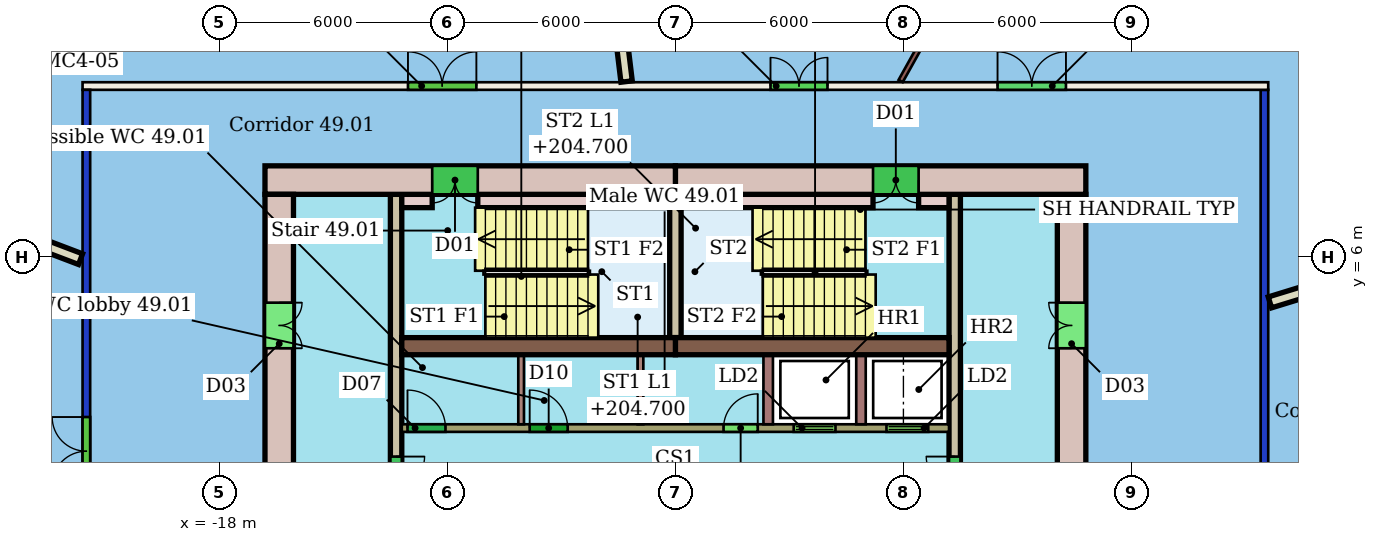
"""IFC4 building model, lengths in metres.
Left out: names, types, materials, properties, quantities, classifications, styles, units other than length and angle.
Written with IfcOpenShell. Run it as: python <this file> out.ifc"""

import sys

from ifc_helpers import new_model, si_unit, direction, frame, frame_2d, origin, place, context, subcontext, project, spatial, rectangle, extrude, element, fill, save


model = new_model("IFC4")
c1 = context("Model", 3, precision=1e-05, world=origin(), true_north=direction((0.0, 1.0)))
c2 = subcontext(c1, "Body", "Model", "MODEL_VIEW")
j1 = project(units=[si_unit("LENGTHUNIT", "METRE"), si_unit("PLANEANGLEUNIT", "RADIAN")], contexts=[c1])
p1 = place(None, origin())
s1 = spatial("IfcSite", under=j1, at=p1, CompositionType="ELEMENT")
p2 = place(p1, origin())
s2 = spatial("IfcBuilding", under=s1, at=p2, CompositionType="ELEMENT")
p3 = place(p2, frame((0.0, 0.0, 202.9)))
s3 = spatial("IfcBuildingStorey", under=s2, at=p3, CompositionType="ELEMENT", Elevation=202.9)
p4 = place(p3, frame((-21.5, -10.4, 0.0), z_axis=(0.0, 0.0, 1.0), x_axis=(0.0, 1.0, 0.0)))
e1 = element("IfcWall", 1, at=p4, inside=s3, PredefinedType="PARTITIONING", context=c2, shape_type="SweptSolid", body=[
    extrude(rectangle(XDim=20.8, YDim=0.2, at=frame_2d((10.4, 0.0))), origin(), (0.0, 0.0, 1.0), 3.05),
])
p5 = place(p4, frame((10.391, 0.0, 0.0)))
e2 = element("IfcOpeningElement", 2, at=p5, cuts=e1, PredefinedType="OPENING", context=c2, shape_type="SweptSolid", body=[
    extrude(rectangle(XDim=1.8, YDim=2.4, at=frame_2d((0.9, 1.2))), frame((0.0, 0.11, 0.0), z_axis=(0.0, -1.0, 0.0), x_axis=(1.0, 0.0, 0.0)), (0.0, 0.0, 1.0), 0.22),
])
p6 = place(p3, frame((-21.6, 10.5, 0.0), z_axis=(0.0, 0.0, 1.0), x_axis=(1.0, 0.0, 0.0)))
e3 = element("IfcWall", 3, at=p6, inside=s3, PredefinedType="PARTITIONING", context=c2, shape_type="SweptSolid", body=[
    extrude(rectangle(XDim=31.2, YDim=0.2, at=frame_2d((15.6, 0.0))), origin(), (0.0, 0.0, 1.0), 3.45),
])
p7 = place(p6, frame((18.102, 0.0, 0.0)))
e4 = element("IfcOpeningElement", 4, at=p7, cuts=e3, PredefinedType="OPENING", context=c2, shape_type="SweptSolid", body=[
    extrude(rectangle(XDim=1.5, YDim=2.1, at=frame_2d((0.75, 1.05))), frame((0.0, 0.11, 0.0), z_axis=(0.0, -1.0, 0.0), x_axis=(1.0, 0.0, 0.0)), (0.0, 0.0, 1.0), 0.22),
])
p8 = place(p6, frame((8.563, 0.0, 0.0)))
e5 = element("IfcOpeningElement", 5, at=p8, cuts=e3, PredefinedType="OPENING", context=c2, shape_type="SweptSolid", body=[
    extrude(rectangle(XDim=1.8, YDim=2.4, at=frame_2d((0.9, 1.2))), frame((0.0, 0.11, 0.0), z_axis=(0.0, -1.0, 0.0), x_axis=(1.0, 0.0, 0.0)), (0.0, 0.0, 1.0), 0.22),
])
p9 = place(p6, frame((24.077, 0.0, 0.0)))
e6 = element("IfcOpeningElement", 6, at=p9, cuts=e3, PredefinedType="OPENING", context=c2, shape_type="SweptSolid", body=[
    extrude(rectangle(XDim=1.8, YDim=2.1, at=frame_2d((0.9, 1.05))), frame((0.0, 0.11, 0.0), z_axis=(0.0, -1.0, 0.0), x_axis=(1.0, 0.0, 0.0)), (0.0, 0.0, 1.0), 0.22),
])
p10 = place(p3, frame((9.5, 10.4, 0.0), z_axis=(0.0, 0.0, 1.0), x_axis=(0.0, -1.0, 0.0)))
e7 = element("IfcWall", 7, at=p10, inside=s3, PredefinedType="PARTITIONING", context=c2, shape_type="SweptSolid", body=[
    extrude(rectangle(XDim=20.8, YDim=0.2, at=frame_2d((10.4, 0.0))), origin(), (0.0, 0.0, 1.0), 3.05),
])
p11 = place(p10, frame((9.885, 0.0, 0.0)))
e8 = element("IfcOpeningElement", 8, at=p11, cuts=e7, PredefinedType="OPENING", context=c2, shape_type="SweptSolid", body=[
    extrude(rectangle(XDim=1.8, YDim=2.4, at=frame_2d((0.9, 1.2))), frame((0.0, 0.11, 0.0), z_axis=(0.0, -1.0, 0.0), x_axis=(1.0, 0.0, 0.0)), (0.0, 0.0, 1.0), 0.22),
])
p12 = place(p3, frame((6.863, 23.071, 0.0), z_axis=(0.0, 0.0, 1.0), x_axis=(-0.486953657805, -0.873427807635, 0.0)))
e9 = element("IfcWall", 9, at=p12, inside=s3, PredefinedType="PARTITIONING", context=c2, shape_type="SweptSolid", body=[
    extrude(rectangle(XDim=14.243, YDim=0.125, at=frame_2d((7.122, 0.0))), origin(), (0.0, 0.0, 1.0), 3.45),
])
p13 = place(p3, frame((-8.816, 23.289, 0.0), z_axis=(0.0, 0.0, 1.0), x_axis=(0.120069156686, -0.992765530029, 0.0)))
e10 = element("IfcWall", 10, at=p13, inside=s3, PredefinedType="PARTITIONING", context=c2, shape_type="SweptSolid", body=[
    extrude(rectangle(XDim=12.763, YDim=0.3, at=frame_2d((6.382, 0.0))), origin(), (0.0, 0.0, 1.0), 3.45),
])
p14 = place(p3, frame((-27.419, 8.134, 0.0), z_axis=(0.0, 0.0, 1.0), x_axis=(0.934858486825, -0.355020576322, 0.0)))
e11 = element("IfcWall", 11, at=p14, inside=s3, PredefinedType="PARTITIONING", context=c2, shape_type="SweptSolid", body=[
    extrude(rectangle(XDim=6.167, YDim=0.3, at=frame_2d((3.083, 0.0))), origin(), (0.0, 0.0, 1.0), 3.45),
])
p15 = place(p3, frame((18.788, 7.617, 0.0), z_axis=(0.0, 0.0, 1.0), x_axis=(-0.955883790435, -0.293745092188, 0.0)))
e12 = element("IfcWall", 12, at=p15, inside=s3, PredefinedType="PARTITIONING", context=c2, shape_type="SweptSolid", body=[
    extrude(rectangle(XDim=9.566, YDim=0.3, at=frame_2d((4.783, 0.0))), origin(), (0.0, 0.0, 1.0), 3.45),
])
p16 = place(p3, frame((4.8, 8.025, 0.0), z_axis=(0.0, 0.0, 1.0), x_axis=(-1.0, 0.0, 0.0)))
e13 = element("IfcWall", 13, at=p16, inside=s3, PredefinedType="SHEAR", context=c2, shape_type="SweptSolid", body=[
    extrude(rectangle(XDim=10.8, YDim=0.75, at=frame_2d((5.4, 0.0))), origin(), (0.0, 0.0, 1.0), 3.3),
])
p17 = place(p16, frame((4.4, 0.0, 0.0)))
e14 = element("IfcOpeningElement", 14, at=p17, cuts=e13, PredefinedType="OPENING", context=c2, shape_type="SweptSolid", body=[
    extrude(rectangle(XDim=1.2, YDim=2.1, at=frame_2d((0.6, 1.05))), frame((0.0, 0.385, 0.0), z_axis=(0.0, -1.0, 0.0), x_axis=(1.0, 0.0, 0.0)), (0.0, 0.0, 1.0), 0.77),
])
p18 = place(p3, frame((-6.0, 8.025, 0.0), z_axis=(0.0, 0.0, 1.0), x_axis=(-1.0, 0.0, 0.0)))
e15 = element("IfcWall", 15, at=p18, inside=s3, PredefinedType="SHEAR", context=c2, shape_type="SweptSolid", body=[
    extrude(rectangle(XDim=10.8, YDim=0.75, at=frame_2d((5.4, 0.0))), origin(), (0.0, 0.0, 1.0), 3.3),
])
p19 = place(p18, frame((5.2, 0.0, 0.0)))
e16 = element("IfcOpeningElement", 16, at=p19, cuts=e15, PredefinedType="OPENING", context=c2, shape_type="SweptSolid", body=[
    extrude(rectangle(XDim=1.2, YDim=2.1, at=frame_2d((0.6, 1.05))), frame((0.0, 0.385, 0.0), z_axis=(0.0, -1.0, 0.0), x_axis=(1.0, 0.0, 0.0)), (0.0, 0.0, 1.0), 0.77),
])
p20 = place(p3, frame((-16.425, 7.65, 0.0), z_axis=(0.0, 0.0, 1.0), x_axis=(0.0, -1.0, 0.0)))
e17 = element("IfcWall", 17, at=p20, inside=s3, PredefinedType="SHEAR", context=c2, shape_type="SweptSolid", body=[
    extrude(rectangle(XDim=15.3, YDim=0.75, at=frame_2d((7.65, 0.0))), origin(), (0.0, 0.0, 1.0), 3.3),
])
p21 = place(p20, frame((11.25, 0.0, 0.0)))
e18 = element("IfcOpeningElement", 18, at=p21, cuts=e17, PredefinedType="OPENING", context=c2, shape_type="SweptSolid", body=[
    extrude(rectangle(XDim=1.2, YDim=2.1, at=frame_2d((0.6, 1.05))), frame((0.0, 0.385, 0.0), z_axis=(0.0, -1.0, 0.0), x_axis=(1.0, 0.0, 0.0)), (0.0, 0.0, 1.0), 0.77),
])
p22 = place(p20, frame((2.85, 0.0, 0.0)))
e19 = element("IfcOpeningElement", 19, at=p22, cuts=e17, PredefinedType="OPENING", context=c2, shape_type="SweptSolid", body=[
    extrude(rectangle(XDim=1.2, YDim=2.1, at=frame_2d((0.6, 1.05))), frame((0.0, 0.385, 0.0), z_axis=(0.0, -1.0, 0.0), x_axis=(1.0, 0.0, 0.0)), (0.0, 0.0, 1.0), 0.77),
])
p23 = place(p3, frame((4.425, -7.65, 0.0), z_axis=(0.0, 0.0, 1.0), x_axis=(0.0, 1.0, 0.0)))
e20 = element("IfcWall", 20, at=p23, inside=s3, PredefinedType="SHEAR", context=c2, shape_type="SweptSolid", body=[
    extrude(rectangle(XDim=15.3, YDim=0.75, at=frame_2d((7.65, 0.0))), origin(), (0.0, 0.0, 1.0), 3.3),
])
p24 = place(p23, frame((2.85, 0.0, 0.0)))
e21 = element("IfcOpeningElement", 21, at=p24, cuts=e20, PredefinedType="OPENING", context=c2, shape_type="SweptSolid", body=[
    extrude(rectangle(XDim=1.2, YDim=2.1, at=frame_2d((0.6, 1.05))), frame((0.0, 0.385, 0.0), z_axis=(0.0, -1.0, 0.0), x_axis=(1.0, 0.0, 0.0)), (0.0, 0.0, 1.0), 0.77),
])
p25 = place(p23, frame((11.25, 0.0, 0.0)))
e22 = element("IfcOpeningElement", 22, at=p25, cuts=e20, PredefinedType="OPENING", context=c2, shape_type="SweptSolid", body=[
    extrude(rectangle(XDim=1.2, YDim=2.1, at=frame_2d((0.6, 1.05))), frame((0.0, 0.385, 0.0), z_axis=(0.0, -1.0, 0.0), x_axis=(1.0, 0.0, 0.0)), (0.0, 0.0, 1.0), 0.77),
])
for number, where, z_axis, x_axis in (
    (23, (-13.2, 3.655, 0.0), (0.0, 0.0, 1.0), (1.0, 0.0, 0.0)),
    (24, (-6.0, 3.655, 0.0), (0.0, 0.0, 1.0), (1.0, 0.0, 0.0)),
):
    element("IfcWall", number, at=place(p3, frame(where, z_axis=z_axis, x_axis=x_axis)), inside=s3, PredefinedType="SHEAR", context=c2, shape_type="SweptSolid", body=[
        extrude(rectangle(XDim=7.2, YDim=0.45, at=frame_2d((3.6, 0.0))), origin(), (0.0, 0.0, 1.0), 3.3),
    ])
p26 = place(p3, frame((-13.35, 7.65, 0.0), z_axis=(0.0, 0.0, 1.0), x_axis=(0.0, -1.0, 0.0)))
e25 = element("IfcWall", 25, at=p26, inside=s3, PredefinedType="SHEAR", context=c2, shape_type="SweptSolid", body=[
    extrude(rectangle(XDim=15.3, YDim=0.3, at=frame_2d((7.65, 0.0))), origin(), (0.0, 0.0, 1.0), 3.3),
])
p27 = place(p26, frame((6.9, 0.0, 0.0)))
e26 = element("IfcOpeningElement", 26, at=p27, cuts=e25, PredefinedType="OPENING", context=c2, shape_type="SweptSolid", body=[
    extrude(rectangle(XDim=1.5, YDim=2.1, at=frame_2d((0.75, 1.05))), frame((0.0, 0.16, 0.0), z_axis=(0.0, -1.0, 0.0), x_axis=(1.0, 0.0, 0.0)), (0.0, 0.0, 1.0), 0.32),
])
p28 = place(p3, frame((1.35, -7.65, 0.0), z_axis=(0.0, 0.0, 1.0), x_axis=(0.0, 1.0, 0.0)))
e27 = element("IfcWall", 27, at=p28, inside=s3, PredefinedType="SHEAR", context=c2, shape_type="SweptSolid", body=[
    extrude(rectangle(XDim=15.3, YDim=0.3, at=frame_2d((7.65, 0.0))), origin(), (0.0, 0.0, 1.0), 3.3),
])
p29 = place(p28, frame((1.56, 0.0, 0.0)))
e28 = element("IfcOpeningElement", 28, at=p29, cuts=e27, PredefinedType="OPENING", context=c2, shape_type="SweptSolid", body=[
    extrude(rectangle(XDim=1.0, YDim=2.1, at=frame_2d((0.5, 1.05))), frame((0.0, 0.16, 0.0), z_axis=(0.0, -1.0, 0.0), x_axis=(1.0, 0.0, 0.0)), (0.0, 0.0, 1.0), 0.32),
])
p30 = place(p28, frame((6.9, 0.0, 0.0)))
e29 = element("IfcOpeningElement", 29, at=p30, cuts=e27, PredefinedType="OPENING", context=c2, shape_type="SweptSolid", body=[
    extrude(rectangle(XDim=1.5, YDim=2.1, at=frame_2d((0.75, 1.05))), frame((0.0, 0.16, 0.0), z_axis=(0.0, -1.0, 0.0), x_axis=(1.0, 0.0, 0.0)), (0.0, 0.0, 1.0), 0.32),
])
p31 = place(p3, frame((-13.2, 1.5, 0.0), z_axis=(0.0, 0.0, 1.0), x_axis=(1.0, 0.0, 0.0)))
e30 = element("IfcWall", 30, at=p31, inside=s3, PredefinedType="SHEAR", context=c2, shape_type="SweptSolid", body=[
    extrude(rectangle(XDim=14.4, YDim=0.2, at=frame_2d((7.2, 0.0))), origin(), (0.0, 0.0, 1.0), 3.3),
])
p32 = place(p31, frame((10.312, 0.0, 0.0)))
e31 = element("IfcOpeningElement", 31, at=p32, cuts=e30, PredefinedType="OPENING", context=c2, shape_type="SweptSolid", body=[
    extrude(rectangle(XDim=1.1, YDim=2.1, at=frame_2d((0.55, 1.05))), frame((0.0, 0.11, 0.0), z_axis=(0.0, -1.0, 0.0), x_axis=(1.0, 0.0, 0.0)), (0.0, 0.0, 1.0), 0.22),
])
p33 = place(p31, frame((12.754, 0.0, 0.0)))
e32 = element("IfcOpeningElement", 32, at=p33, cuts=e30, PredefinedType="OPENING", context=c2, shape_type="SweptSolid", body=[
    extrude(rectangle(XDim=1.1, YDim=2.1, at=frame_2d((0.55, 1.05))), frame((0.0, 0.11, 0.0), z_axis=(0.0, -1.0, 0.0), x_axis=(1.0, 0.0, 0.0)), (0.0, 0.0, 1.0), 0.22),
])
p34 = place(p31, frame((0.15, 0.0, 0.0)))
e33 = element("IfcOpeningElement", 33, at=p34, cuts=e30, PredefinedType="OPENING", context=c2, shape_type="SweptSolid", body=[
    extrude(rectangle(XDim=1.0, YDim=2.1, at=frame_2d((0.5, 1.05))), frame((0.0, 0.11, 0.0), z_axis=(0.0, -1.0, 0.0), x_axis=(1.0, 0.0, 0.0)), (0.0, 0.0, 1.0), 0.22),
])
p35 = place(p31, frame((3.365, 0.0, 0.0)))
e34 = element("IfcOpeningElement", 34, at=p35, cuts=e30, PredefinedType="OPENING", context=c2, shape_type="SweptSolid", body=[
    extrude(rectangle(XDim=1.0, YDim=2.1, at=frame_2d((0.5, 1.05))), frame((0.0, 0.11, 0.0), z_axis=(0.0, -1.0, 0.0), x_axis=(1.0, 0.0, 0.0)), (0.0, 0.0, 1.0), 0.22),
])
p36 = place(p31, frame((8.467, 0.0, 0.0)))
e35 = element("IfcOpeningElement", 35, at=p36, cuts=e30, PredefinedType="OPENING", context=c2, shape_type="SweptSolid", body=[
    extrude(rectangle(XDim=0.9, YDim=2.1, at=frame_2d((0.45, 1.05))), frame((0.0, 0.11, 0.0), z_axis=(0.0, -1.0, 0.0), x_axis=(1.0, 0.0, 0.0)), (0.0, 0.0, 1.0), 0.22),
])
p37 = place(p3, frame((-6.0, 3.88, 0.0), z_axis=(0.0, 0.0, 1.0), x_axis=(0.0, 1.0, 0.0)))
e36 = element("IfcWall", 36, at=p37, inside=s3, PredefinedType="SHEAR", context=c2, shape_type="SweptSolid", body=[
    extrude(rectangle(XDim=3.77, YDim=0.3, at=frame_2d((1.885, 0.0))), origin(), (0.0, 0.0, 1.0), 3.3),
])
p38 = place(p3, frame((-13.2, 7.475, 0.0), z_axis=(0.0, 0.0, 1.0), x_axis=(1.0, 0.0, 0.0)))
e37 = element("IfcWall", 37, at=p38, inside=s3, PredefinedType="SHEAR", context=c2, shape_type="SweptSolid", body=[
    extrude(rectangle(XDim=0.8, YDim=0.35, at=frame_2d((0.4, 0.0))), origin(), (0.0, 0.0, 1.0), 3.3),
])
for number, where, z_axis, x_axis in (
    (38, (-11.2, 7.475, 0.0), (0.0, 0.0, 1.0), (1.0, 0.0, 0.0)),
    (39, (-5.85, 7.475, 0.0), (0.0, 0.0, 1.0), (1.0, 0.0, 0.0)),
):
    element("IfcWall", number, at=place(p3, frame(where, z_axis=z_axis, x_axis=x_axis)), inside=s3, PredefinedType="SHEAR", context=c2, shape_type="SweptSolid", body=[
        extrude(rectangle(XDim=5.05, YDim=0.35, at=frame_2d((2.525, 0.0))), origin(), (0.0, 0.0, 1.0), 3.3),
    ])
p39 = place(p3, frame((0.4, 7.475, 0.0), z_axis=(0.0, 0.0, 1.0), x_axis=(1.0, 0.0, 0.0)))
e40 = element("IfcWall", 40, at=p39, inside=s3, PredefinedType="SHEAR", context=c2, shape_type="SweptSolid", body=[
    extrude(rectangle(XDim=0.8, YDim=0.35, at=frame_2d((0.4, 0.0))), origin(), (0.0, 0.0, 1.0), 3.3),
])
for number, where, z_axis, x_axis in (
    (41, (-3.558, 1.6, 0.0), (0.0, 0.0, 1.0), (0.0, 1.0, 0.0)),
    (42, (-1.117, 1.6, 0.0), (0.0, 0.0, 1.0), (0.0, 1.0, 0.0)),
):
    element("IfcWall", number, at=place(p3, frame(where, z_axis=z_axis, x_axis=x_axis)), inside=s3, PredefinedType="SHEAR", context=c2, shape_type="SweptSolid", body=[
        extrude(rectangle(XDim=1.83, YDim=0.25, at=frame_2d((0.915, 0.0))), origin(), (0.0, 0.0, 1.0), 3.3),
    ])
for number, where, z_axis, x_axis in (
    (43, (-10.06, 1.6, 0.0), (0.0, 0.0, 1.0), (0.0, 1.0, 0.0)),
    (44, (-6.919, 1.6, 0.0), (0.0, 0.0, 1.0), (0.0, 1.0, 0.0)),
):
    element("IfcWall", number, at=place(p3, frame(where, z_axis=z_axis, x_axis=x_axis)), inside=s3, PredefinedType="PARTITIONING", context=c2, shape_type="SweptSolid", body=[
        extrude(rectangle(XDim=1.83, YDim=0.15, at=frame_2d((0.915, 0.0))), origin(), (0.0, 0.0, 1.0), 3.3),
    ])
p40 = place(p7, origin())
e45 = element("IfcDoor", 45, at=p40, inside=s3, OperationType="DOUBLE_DOOR_SINGLE_SWING", PredefinedType="DOOR", context=c2, shape_type="SweptSolid", body=[
    extrude(rectangle(XDim=1.5, YDim=2.1, at=frame_2d((0.75, 1.05))), frame((0.0, 0.025, 0.0), z_axis=(0.0, -1.0, 0.0), x_axis=(1.0, 0.0, 0.0)), (0.0, 0.0, 1.0), 0.05),
])
fill(e4, e45)
p41 = place(p8, origin())
e46 = element("IfcDoor", 46, at=p41, inside=s3, OperationType="DOUBLE_DOOR_SINGLE_SWING", PredefinedType="DOOR", context=c2, shape_type="SweptSolid", body=[
    extrude(rectangle(XDim=1.8, YDim=2.4, at=frame_2d((0.9, 1.2))), frame((0.0, 0.025, 0.0), z_axis=(0.0, -1.0, 0.0), x_axis=(1.0, 0.0, 0.0)), (0.0, 0.0, 1.0), 0.05),
])
fill(e5, e46)
p42 = place(p5, origin())
e47 = element("IfcDoor", 47, at=p42, inside=s3, OperationType="DOUBLE_DOOR_SINGLE_SWING", PredefinedType="DOOR", context=c2, shape_type="SweptSolid", body=[
    extrude(rectangle(XDim=1.8, YDim=2.4, at=frame_2d((0.9, 1.2))), frame((0.0, 0.025, 0.0), z_axis=(0.0, -1.0, 0.0), x_axis=(1.0, 0.0, 0.0)), (0.0, 0.0, 1.0), 0.05),
])
fill(e2, e47)
p43 = place(p9, origin())
e48 = element("IfcDoor", 48, at=p43, inside=s3, OperationType="DOUBLE_DOOR_SINGLE_SWING", PredefinedType="DOOR", context=c2, shape_type="SweptSolid", body=[
    extrude(rectangle(XDim=1.8, YDim=2.1, at=frame_2d((0.9, 1.05))), frame((0.0, 0.025, 0.0), z_axis=(0.0, -1.0, 0.0), x_axis=(1.0, 0.0, 0.0)), (0.0, 0.0, 1.0), 0.05),
])
fill(e6, e48)
p44 = place(p17, origin())
e49 = element("IfcDoor", 49, at=p44, inside=s3, OperationType="DOUBLE_DOOR_SINGLE_SWING", PredefinedType="NOTDEFINED", context=c2, shape_type="SweptSolid", body=[
    extrude(rectangle(XDim=1.2, YDim=2.1, at=frame_2d((0.6, 1.05))), frame((0.0, 0.025, 0.0), z_axis=(0.0, -1.0, 0.0), x_axis=(1.0, 0.0, 0.0)), (0.0, 0.0, 1.0), 0.05),
])
fill(e14, e49)
p45 = place(p19, origin())
e50 = element("IfcDoor", 50, at=p45, inside=s3, OperationType="DOUBLE_DOOR_SINGLE_SWING", PredefinedType="NOTDEFINED", context=c2, shape_type="SweptSolid", body=[
    extrude(rectangle(XDim=1.2, YDim=2.1, at=frame_2d((0.6, 1.05))), frame((0.0, 0.025, 0.0), z_axis=(0.0, -1.0, 0.0), x_axis=(1.0, 0.0, 0.0)), (0.0, 0.0, 1.0), 0.05),
])
fill(e16, e50)
p46 = place(p22, origin())
e51 = element("IfcDoor", 51, at=p46, inside=s3, OperationType="DOUBLE_DOOR_SINGLE_SWING", PredefinedType="NOTDEFINED", context=c2, shape_type="SweptSolid", body=[
    extrude(rectangle(XDim=1.2, YDim=2.1, at=frame_2d((0.6, 1.05))), frame((0.0, 0.025, 0.0), z_axis=(0.0, -1.0, 0.0), x_axis=(1.0, 0.0, 0.0)), (0.0, 0.0, 1.0), 0.05),
])
fill(e19, e51)
p47 = place(p25, origin())
e52 = element("IfcDoor", 52, at=p47, inside=s3, OperationType="DOUBLE_DOOR_SINGLE_SWING", PredefinedType="NOTDEFINED", context=c2, shape_type="SweptSolid", body=[
    extrude(rectangle(XDim=1.2, YDim=2.1, at=frame_2d((0.6, 1.05))), frame((0.0, 0.025, 0.0), z_axis=(0.0, -1.0, 0.0), x_axis=(1.0, 0.0, 0.0)), (0.0, 0.0, 1.0), 0.05),
])
fill(e22, e52)
p48 = place(p27, origin())
e53 = element("IfcDoor", 53, at=p48, inside=s3, OperationType="DOUBLE_DOOR_SINGLE_SWING", PredefinedType="NOTDEFINED", context=c2, shape_type="SweptSolid", body=[
    extrude(rectangle(XDim=1.5, YDim=2.1, at=frame_2d((0.75, 1.05))), frame((0.0, 0.025, 0.0), z_axis=(0.0, -1.0, 0.0), x_axis=(1.0, 0.0, 0.0)), (0.0, 0.0, 1.0), 0.05),
])
fill(e26, e53)
p49 = place(p30, origin())
e54 = element("IfcDoor", 54, at=p49, inside=s3, OperationType="DOUBLE_DOOR_SINGLE_SWING", PredefinedType="NOTDEFINED", context=c2, shape_type="SweptSolid", body=[
    extrude(rectangle(XDim=1.5, YDim=2.1, at=frame_2d((0.75, 1.05))), frame((0.0, 0.025, 0.0), z_axis=(0.0, -1.0, 0.0), x_axis=(1.0, 0.0, 0.0)), (0.0, 0.0, 1.0), 0.05),
])
fill(e29, e54)
p50 = place(p32, origin())
e55 = element("IfcDoor", 55, at=p50, inside=s3, OperationType="DOUBLE_DOOR_SLIDING", PredefinedType="NOTDEFINED", context=c2, shape_type="SweptSolid", body=[
    extrude(rectangle(XDim=1.1, YDim=2.1, at=frame_2d((0.55, 1.05))), frame((0.0, 0.025, 0.0), z_axis=(0.0, -1.0, 0.0), x_axis=(1.0, 0.0, 0.0)), (0.0, 0.0, 1.0), 0.05),
])
fill(e31, e55)
p51 = place(p33, origin())
e56 = element("IfcDoor", 56, at=p51, inside=s3, OperationType="DOUBLE_DOOR_SLIDING", PredefinedType="NOTDEFINED", context=c2, shape_type="SweptSolid", body=[
    extrude(rectangle(XDim=1.1, YDim=2.1, at=frame_2d((0.55, 1.05))), frame((0.0, 0.025, 0.0), z_axis=(0.0, -1.0, 0.0), x_axis=(1.0, 0.0, 0.0)), (0.0, 0.0, 1.0), 0.05),
])
fill(e32, e56)
p52 = place(p34, origin())
e57 = element("IfcDoor", 57, at=p52, inside=s3, OperationType="SINGLE_SWING_LEFT", PredefinedType="NOTDEFINED", context=c2, shape_type="SweptSolid", body=[
    extrude(rectangle(XDim=1.0, YDim=2.1, at=frame_2d((0.5, 1.05))), frame((0.0, 0.025, 0.0), z_axis=(0.0, -1.0, 0.0), x_axis=(1.0, 0.0, 0.0)), (0.0, 0.0, 1.0), 0.05),
])
fill(e33, e57)
p53 = place(p35, origin())
e58 = element("IfcDoor", 58, at=p53, inside=s3, OperationType="SINGLE_SWING_LEFT", PredefinedType="NOTDEFINED", context=c2, shape_type="SweptSolid", body=[
    extrude(rectangle(XDim=1.0, YDim=2.1, at=frame_2d((0.5, 1.05))), frame((0.0, 0.025, 0.0), z_axis=(0.0, -1.0, 0.0), x_axis=(1.0, 0.0, 0.0)), (0.0, 0.0, 1.0), 0.05),
])
fill(e34, e58)
p54 = place(p36, origin())
e59 = element("IfcDoor", 59, at=p54, inside=s3, OperationType="SINGLE_SWING_RIGHT", PredefinedType="NOTDEFINED", context=c2, shape_type="SweptSolid", body=[
    extrude(rectangle(XDim=0.9, YDim=2.1, at=frame_2d((0.45, 1.05))), frame((0.0, 0.025, 0.0), z_axis=(0.0, -1.0, 0.0), x_axis=(1.0, 0.0, 0.0)), (0.0, 0.0, 1.0), 0.05),
])
fill(e35, e59)
save(model, sys.argv[1])
